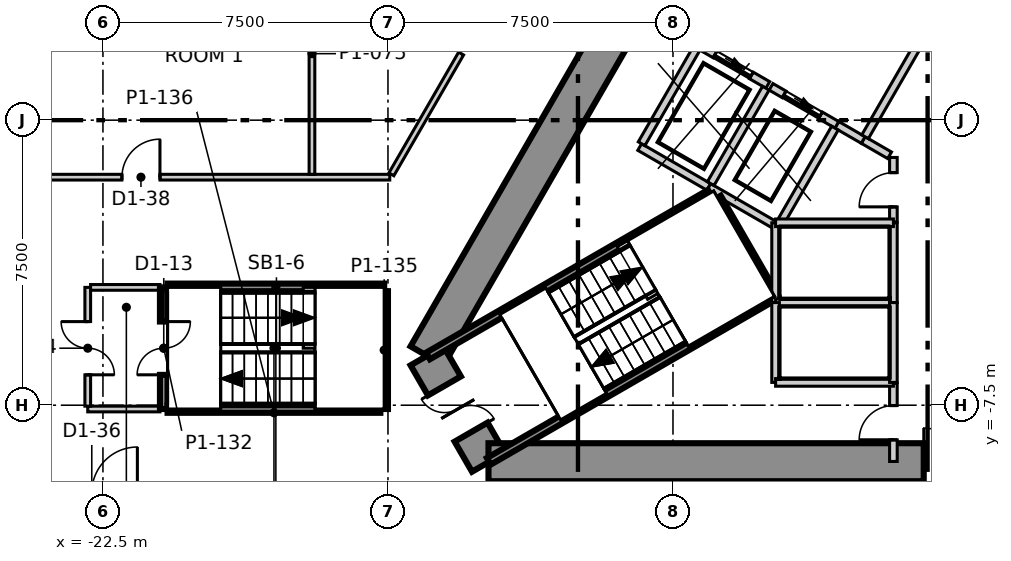
"""IFC4 building model, lengths in metres.
Left out: names, types, materials, properties, quantities, classifications, styles, units other than length and angle.
Written with IfcOpenShell. Run it as: python <this file> out.ifc"""

import sys

from ifc_helpers import new_model, si_unit, direction, frame, frame_2d, origin, place, context, subcontext, project, spatial, polyline, rectangle, outline, extrude, element, fill, save


model = new_model("IFC4")
c1 = context("Model", 3, precision=1e-05, world=origin(), true_north=direction((0.0, 1.0)))
c2 = subcontext(c1, "Body", "Model", "MODEL_VIEW")
j1 = project(units=[si_unit("LENGTHUNIT", "METRE"), si_unit("PLANEANGLEUNIT", "RADIAN")], contexts=[c1])
p1 = place(None, origin())
s1 = spatial("IfcSite", under=j1, at=p1, CompositionType="ELEMENT")
p2 = place(p1, origin())
s2 = spatial("IfcBuilding", under=s1, at=p2, CompositionType="ELEMENT")
p3 = place(p2, frame((0.0, 0.0, -5.5)))
s3 = spatial("IfcBuildingStorey", under=s2, at=p3, CompositionType="ELEMENT", Elevation=-5.5)
p4 = place(p3, frame((-3.507, 38.325, -0.4), z_axis=(0.0, 0.0, 1.0), x_axis=(-0.500003790369, -0.866023215403, 0.0)))
e1 = element("IfcWall", 1, at=p4, inside=s3, PredefinedType="SOLIDWALL", context=c2, shape_type="SweptSolid", body=[
    extrude(rectangle(XDim=62.874, YDim=0.6, at=frame_2d((31.437, 0.0))), origin(), (0.0, 0.0, 1.0), 5.5),
])
p5 = place(p3, frame((-1.617, 15.2, -0.4), z_axis=(0.0, 0.0, 1.0), x_axis=(-0.499992141631, -0.866029940768, 0.0)))
e2 = element("IfcWall", 2, at=p5, inside=s3, PredefinedType="SHEAR", context=c2, shape_type="SweptSolid", body=[
    extrude(outline(polyline([(-0.289, -0.499), (1.656, -0.499), (3.601, -0.499), (5.547, -0.499), (7.492, -0.499), (9.437, -0.5), (11.382, -0.5), (13.328, -0.5), (15.273, -0.5), (17.218, -0.5), (19.163, -0.5), (21.109, -0.5), (23.054, -0.5), (24.999, -0.5), (24.422, 0.5), (22.566, 0.5), (20.709, 0.5), (18.853, 0.5), (16.997, 0.5), (15.14, 0.5), (13.284, 0.5), (11.427, 0.5), (9.571, 0.5), (7.715, 0.5), (5.858, 0.5), (4.002, 0.5), (2.146, 0.5), (0.289, 0.5), (-0.289, -0.499)])), origin(), (0.0, 0.0, 1.0), 5.5),
])
p6 = place(p5, frame((11.805, 0.0, 0.4)))
e3 = element("IfcOpeningElement", 3, at=p6, cuts=e2, PredefinedType="OPENING", context=c2, shape_type="SweptSolid", body=[
    extrude(rectangle(XDim=1.1, YDim=2.1, at=frame_2d((0.55, 1.05))), frame((0.0, 0.51, 0.0), z_axis=(0.0, -1.0, 0.0), x_axis=(1.0, 0.0, 0.0)), (0.0, 0.0, 1.0), 1.02),
])
p7 = place(p3, frame((-13.972, -6.2, -0.4), z_axis=(0.0, 0.0, 1.0), x_axis=(0.500077567175, -0.865980615723, 0.0)))
e4 = element("IfcWall", 4, at=p7, inside=s3, PredefinedType="SHEAR", context=c2, shape_type="SweptSolid", body=[
    extrude(outline(polyline([(-0.289, -0.5), (1.616, -0.5), (3.522, -0.5), (2.944, 0.499), (1.617, 0.5), (0.289, 0.5), (-0.289, -0.5)])), origin(), (0.0, 0.0, 1.0), 5.5),
])
p8 = place(p7, frame((0.917, 0.0, 0.4)))
e5 = element("IfcOpeningElement", 5, at=p8, cuts=e4, PredefinedType="OPENING", context=c2, shape_type="SweptSolid", body=[
    extrude(rectangle(XDim=1.4, YDim=2.1, at=frame_2d((0.7, 1.05))), frame((0.0, 0.51, 0.0), z_axis=(0.0, -1.0, 0.0), x_axis=(1.0, 0.0, 0.0)), (0.0, 0.0, 1.0), 1.02),
])
p9 = place(p3, frame((-12.355, -9.0, -0.4), z_axis=(0.0, 0.0, 1.0), x_axis=(1.0, 0.0, 0.0)))
e6 = element("IfcWall", 6, at=p9, inside=s3, PredefinedType="SHEAR", context=c2, shape_type="SweptSolid", body=[
    extrude(outline(polyline([(-0.289, -0.5), (1.656, -0.5), (3.601, -0.5), (5.547, -0.5), (7.492, -0.5), (9.437, -0.5), (11.382, -0.5), (13.328, -0.5), (15.273, -0.5), (17.218, -0.5), (19.163, -0.5), (21.109, -0.5), (23.054, -0.5), (24.999, -0.5), (24.422, 0.5), (22.566, 0.5), (20.709, 0.5), (18.853, 0.5), (16.996, 0.5), (15.14, 0.5), (13.283, 0.5), (11.427, 0.5), (9.57, 0.5), (7.714, 0.5), (5.857, 0.5), (4.001, 0.5), (2.145, 0.5), (0.288, 0.5), (-0.289, -0.5)])), origin(), (0.0, 0.0, 1.0), 5.5),
])
p10 = place(p9, frame((11.455, 0.0, 0.4)))
e7 = element("IfcOpeningElement", 7, at=p10, cuts=e6, PredefinedType="OPENING", context=c2, shape_type="SweptSolid", body=[
    extrude(rectangle(XDim=1.8, YDim=2.1, at=frame_2d((0.9, 1.05))), frame((0.0, 0.51, 0.0), z_axis=(0.0, -1.0, 0.0), x_axis=(1.0, 0.0, 0.0)), (0.0, 0.0, 1.0), 1.02),
])
p11 = place(p3, frame((-22.9, -7.6, 0.0), z_axis=(0.0, 0.0, 1.0), x_axis=(1.0, 0.0, 0.0)))
e8 = element("IfcWall", 8, at=p11, inside=s3, PredefinedType="PARTITIONING", context=c2, shape_type="SweptSolid", body=[
    extrude(rectangle(XDim=1.9, YDim=0.15, at=frame_2d((0.95, 0.0))), origin(), (0.0, 0.0, 1.0), 5.1),
])
p12 = place(p3, frame((-22.9, -7.525, 0.0), z_axis=(0.0, 0.0, 1.0), x_axis=(0.0, 1.0, 0.0)))
e9 = element("IfcWall", 9, at=p12, inside=s3, PredefinedType="PARTITIONING", context=c2, shape_type="SweptSolid", body=[
    extrude(rectangle(XDim=3.125, YDim=0.15, at=frame_2d((1.562, 0.0))), origin(), (0.0, 0.0, 1.0), 5.1),
])
p13 = place(p12, frame((0.825, 0.0, 0.0)))
e10 = element("IfcOpeningElement", 10, at=p13, cuts=e9, PredefinedType="OPENING", context=c2, shape_type="SweptSolid", body=[
    extrude(rectangle(XDim=1.4, YDim=2.1, at=frame_2d((0.7, 1.05))), frame((0.0, 0.085, 0.0), z_axis=(0.0, -1.0, 0.0), x_axis=(1.0, 0.0, 0.0)), (0.0, 0.0, 1.0), 0.17),
])
p14 = place(p3, frame((-22.825, -4.4, 0.0), z_axis=(0.0, 0.0, 1.0), x_axis=(1.0, 0.0, 0.0)))
e11 = element("IfcWall", 11, at=p14, inside=s3, PredefinedType="PARTITIONING", context=c2, shape_type="SweptSolid", body=[
    extrude(rectangle(XDim=1.825, YDim=0.15, at=frame_2d((0.913, 0.0))), origin(), (0.0, 0.0, 1.0), 5.1),
])
p15 = place(p3, frame((-26.0, -1.5, 0.0), z_axis=(0.0, 0.0, 1.0), x_axis=(1.0, 0.0, 0.0)))
e12 = element("IfcWall", 12, at=p15, inside=s3, PredefinedType="PARTITIONING", context=c2, shape_type="SweptSolid", body=[
    extrude(rectangle(XDim=11.047, YDim=0.15, at=frame_2d((5.523, 0.0))), origin(), (0.0, 0.0, 1.0), 4.5),
])
p16 = place(p15, frame((4.0, 0.0, 0.0)))
e13 = element("IfcOpeningElement", 13, at=p16, cuts=e12, PredefinedType="OPENING", context=c2, shape_type="SweptSolid", body=[
    extrude(rectangle(XDim=1.0, YDim=2.1, at=frame_2d((0.5, 1.05))), frame((0.0, 0.085, 0.0), z_axis=(0.0, -1.0, 0.0), x_axis=(1.0, 0.0, 0.0)), (0.0, 0.0, 1.0), 0.17),
])
p17 = place(p3, frame((-14.91, -1.425, 0.0), z_axis=(0.0, 0.0, 1.0), x_axis=(0.500031511731, 0.866007209713, 0.0)))
e14 = element("IfcWall", 14, at=p17, inside=s3, PredefinedType="PARTITIONING", context=c2, shape_type="SweptSolid", body=[
    extrude(rectangle(XDim=3.67, YDim=0.15, at=frame_2d((1.835, 0.0))), origin(), (0.0, 0.0, 1.0), 5.1),
])
p18 = place(p3, frame((-17.0, -1.425, 0.0), z_axis=(0.0, 0.0, 1.0), x_axis=(0.0, 1.0, 0.0)))
e15 = element("IfcWall", 15, at=p18, inside=s3, PredefinedType="PARTITIONING", context=c2, shape_type="SweptSolid", body=[
    extrude(rectangle(XDim=6.35, YDim=0.15, at=frame_2d((3.175, 0.0))), origin(), (0.0, 0.0, 1.0), 5.1),
])
p19 = place(p3, frame((-8.376, -0.707, 0.0), z_axis=(0.0, 0.0, 1.0), x_axis=(0.866067520717, -0.499927044236, 0.0)))
e16 = element("IfcWall", 16, at=p19, inside=s3, PredefinedType="SOLIDWALL", context=c2, shape_type="SweptSolid", body=[
    extrude(rectangle(XDim=2.1, YDim=0.2, at=frame_2d((1.05, 0.0))), origin(), (0.0, 0.0, 1.0), 5.1),
])
p20 = place(p3, frame((-8.326, -0.62, 0.0), z_axis=(0.0, 0.0, 1.0), x_axis=(0.500023687443, 0.866011727401, 0.0)))
e17 = element("IfcWall", 17, at=p20, inside=s3, PredefinedType="SOLIDWALL", context=c2, shape_type="SweptSolid", body=[
    extrude(rectangle(XDim=2.9, YDim=0.2, at=frame_2d((1.45, 0.0))), origin(), (0.0, 0.0, 1.0), 5.1),
])
p21 = place(p3, frame((-1.7, -8.98, 0.0), z_axis=(0.0, 0.0, 1.0), x_axis=(0.0, 1.0, 0.0)))
e18 = element("IfcWall", 18, at=p21, inside=s3, PredefinedType="SOLIDWALL", context=c2, shape_type="SweptSolid", body=[
    extrude(rectangle(XDim=2.062, YDim=0.2, at=frame_2d((1.031, 0.0))), origin(), (0.0, 0.0, 1.0), 5.1),
])
p22 = place(p21, frame((0.57, 0.0, 0.0)))
e19 = element("IfcOpeningElement", 19, at=p22, cuts=e18, PredefinedType="OPENING", context=c2, shape_type="SweptSolid", body=[
    extrude(rectangle(XDim=0.9, YDim=2.1, at=frame_2d((0.45, 1.05))), frame((0.0, 0.11, 0.0), z_axis=(0.0, -1.0, 0.0), x_axis=(1.0, 0.0, 0.0)), (0.0, 0.0, 1.0), 0.22),
])
p23 = place(p3, frame((-1.7, -2.682, 0.0), z_axis=(0.0, 0.0, 1.0), x_axis=(0.0, 1.0, 0.0)))
e20 = element("IfcWall", 20, at=p23, inside=s3, PredefinedType="SOLIDWALL", context=c2, shape_type="SweptSolid", body=[
    extrude(rectangle(XDim=1.701, YDim=0.2, at=frame_2d((0.851, 0.0))), origin(), (0.0, 0.0, 1.0), 5.1),
])
p24 = place(p23, frame((0.401, 0.0, 0.0)))
e21 = element("IfcOpeningElement", 21, at=p24, cuts=e20, PredefinedType="OPENING", context=c2, shape_type="SweptSolid", body=[
    extrude(rectangle(XDim=0.9, YDim=2.1, at=frame_2d((0.45, 1.05))), frame((0.0, 0.11, 0.0), z_axis=(0.0, -1.0, 0.0), x_axis=(1.0, 0.0, 0.0)), (0.0, 0.0, 1.0), 0.22),
])
p25 = place(p3, frame((-2.495, -0.522, 0.0), z_axis=(0.0, 0.0, 1.0), x_axis=(0.86559276406, -0.500748606395, 0.0)))
e22 = element("IfcWall", 22, at=p25, inside=s3, PredefinedType="SOLIDWALL", context=c2, shape_type="SweptSolid", body=[
    extrude(rectangle(XDim=0.803, YDim=0.2, at=frame_2d((0.401, 0.0))), origin(), (0.0, 0.0, 1.0), 5.1),
])
p26 = place(p3, frame((-8.627, 3.018, 0.0), z_axis=(0.0, 0.0, 1.0), x_axis=(0.866039775641, -0.499975106388, 0.0)))
e23 = element("IfcWall", 23, at=p26, inside=s3, PredefinedType="SOLIDWALL", context=c2, shape_type="SweptSolid", body=[
    extrude(rectangle(XDim=4.182, YDim=0.2, at=frame_2d((2.091, 0.0))), origin(), (0.0, 0.0, 1.0), 5.1),
])
p27 = place(p26, frame((2.58, 0.0, 0.0)))
e24 = element("IfcOpeningElement", 24, at=p27, cuts=e23, PredefinedType="OPENING", context=c2, shape_type="SweptSolid", body=[
    extrude(rectangle(XDim=1.1, YDim=2.1, at=frame_2d((0.55, 1.05))), frame((0.0, 0.11, 0.0), z_axis=(0.0, -1.0, 0.0), x_axis=(1.0, 0.0, 0.0)), (0.0, 0.0, 1.0), 0.22),
])
p28 = place(p3, frame((-3.19, -0.121, 0.0), z_axis=(0.0, 0.0, 1.0), x_axis=(0.866175452185, -0.499740018442, 0.0)))
e25 = element("IfcWall", 25, at=p28, inside=s3, PredefinedType="SOLIDWALL", context=c2, shape_type="SweptSolid", body=[
    extrude(rectangle(XDim=0.802, YDim=0.2, at=frame_2d((0.401, 0.0))), origin(), (0.0, 0.0, 1.0), 5.1),
])
p29 = place(p3, frame((-2.445, -0.436, 0.0), z_axis=(0.0, 0.0, 1.0), x_axis=(0.499929347863, 0.866066190972, 0.0)))
e26 = element("IfcWall", 26, at=p29, inside=s3, PredefinedType="SOLIDWALL", context=c2, shape_type="SweptSolid", body=[
    extrude(rectangle(XDim=3.201, YDim=0.2, at=frame_2d((1.6, 0.0))), origin(), (0.0, 0.0, 1.0), 5.1),
])
p30 = place(p3, frame((-6.557, -1.757, 0.0), z_axis=(0.0, 0.0, 1.0), x_axis=(0.866019539041, -0.500010157896, 0.0)))
e27 = element("IfcWall", 27, at=p30, inside=s3, PredefinedType="SOLIDWALL", context=c2, shape_type="SweptSolid", body=[
    extrude(rectangle(XDim=2.008, YDim=0.2, at=frame_2d((1.004, 0.0))), origin(), (0.0, 0.0, 1.0), 5.1),
])
p31 = place(p3, frame((-6.507, -1.67, 0.0), z_axis=(0.0, 0.0, 1.0), x_axis=(0.50012328804, 0.865954211699, 0.0)))
e28 = element("IfcWall", 28, at=p31, inside=s3, PredefinedType="SOLIDWALL", context=c2, shape_type="SweptSolid", body=[
    extrude(rectangle(XDim=2.9, YDim=0.2, at=frame_2d((1.45, 0.0))), origin(), (0.0, 0.0, 1.0), 5.1),
])
p32 = place(p3, frame((-4.92, 0.878, 0.0), z_axis=(0.0, 0.0, 1.0), x_axis=(0.866010750942, -0.50002537861, 0.0)))
e29 = element("IfcWall", 29, at=p32, inside=s3, PredefinedType="SOLIDWALL", context=c2, shape_type="SweptSolid", body=[
    extrude(rectangle(XDim=2.0, YDim=0.2, at=frame_2d((1.0, 0.0))), origin(), (0.0, 0.0, 1.0), 5.1),
])
p33 = place(p32, frame((0.4, 0.0, 0.0)))
e30 = element("IfcOpeningElement", 30, at=p33, cuts=e29, PredefinedType="OPENING", context=c2, shape_type="SweptSolid", body=[
    extrude(rectangle(XDim=1.1, YDim=2.1, at=frame_2d((0.55, 1.05))), frame((0.0, 0.11, 0.0), z_axis=(0.0, -1.0, 0.0), x_axis=(1.0, 0.0, 0.0)), (0.0, 0.0, 1.0), 0.22),
])
p34 = place(p3, frame((-4.666, -2.682, 0.0), z_axis=(0.0, 0.0, 1.0), x_axis=(0.500065346707, 0.865987672558, 0.0)))
e31 = element("IfcWall", 31, at=p34, inside=s3, PredefinedType="SOLIDWALL", context=c2, shape_type="SweptSolid", body=[
    extrude(rectangle(XDim=2.855, YDim=0.2, at=frame_2d((1.428, 0.0))), origin(), (0.0, 0.0, 1.0), 5.1),
])
p35 = place(p3, frame((-13.946, -6.204, 0.0), z_axis=(0.0, 0.0, 1.0), x_axis=(0.866036527536, 0.499980732602, 0.0)))
e32 = element("IfcWall", 32, at=p35, inside=s3, PredefinedType="SOLIDWALL", context=c2, shape_type="SweptSolid", body=[
    extrude(rectangle(XDim=8.564, YDim=0.2, at=frame_2d((4.282, 0.0))), origin(), (0.0, 0.0, 1.0), 5.1),
])
p36 = place(p3, frame((-6.329, -2.038, 0.0), z_axis=(0.0, 0.0, 1.0), x_axis=(0.50002537861, -0.866010750942, 0.0)))
e33 = element("IfcWall", 33, at=p36, inside=s3, PredefinedType="SOLIDWALL", context=c2, shape_type="SweptSolid", body=[
    extrude(rectangle(XDim=3.0, YDim=0.2, at=frame_2d((1.5, 0.0))), origin(), (0.0, 0.0, 1.0), 5.1),
])
p37 = place(p3, frame((-12.346, -8.976, 0.0), z_axis=(0.0, 0.0, 1.0), x_axis=(0.866006929508, 0.50003199702, 0.0)))
e34 = element("IfcWall", 34, at=p37, inside=s3, PredefinedType="SOLIDWALL", context=c2, shape_type="SweptSolid", body=[
    extrude(rectangle(XDim=8.58, YDim=0.2, at=frame_2d((4.29, 0.0))), origin(), (0.0, 0.0, 1.0), 5.1),
])
p38 = place(p3, frame((-20.9, -7.6, 0.0), z_axis=(0.0, 0.0, 1.0), x_axis=(0.0, 1.0, 0.0)))
e35 = element("IfcWall", 35, at=p38, inside=s3, PredefinedType="SOLIDWALL", context=c2, shape_type="SweptSolid", body=[
    extrude(rectangle(XDim=3.2, YDim=0.2, at=frame_2d((1.6, 0.0))), origin(), (0.0, 0.0, 1.0), 5.1),
])
p39 = place(p38, frame((0.9, 0.0, 0.0)))
e36 = element("IfcOpeningElement", 36, at=p39, cuts=e35, PredefinedType="OPENING", context=c2, shape_type="SweptSolid", body=[
    extrude(rectangle(XDim=1.4, YDim=2.1, at=frame_2d((0.7, 1.05))), frame((0.0, 0.11, 0.0), z_axis=(0.0, -1.0, 0.0), x_axis=(1.0, 0.0, 0.0)), (0.0, 0.0, 1.0), 0.22),
])
p40 = place(p3, frame((-20.8, -4.4, 0.0), z_axis=(0.0, 0.0, 1.0), x_axis=(1.0, 0.0, 0.0)))
e37 = element("IfcWall", 37, at=p40, inside=s3, PredefinedType="SOLIDWALL", context=c2, shape_type="SweptSolid", body=[
    extrude(rectangle(XDim=5.7, YDim=0.2, at=frame_2d((2.85, 0.0))), origin(), (0.0, 0.0, 1.0), 5.1),
])
p41 = place(p3, frame((-15.1, -7.6, 0.0), z_axis=(0.0, 0.0, 1.0), x_axis=(0.0, 1.0, 0.0)))
e38 = element("IfcWall", 38, at=p41, inside=s3, PredefinedType="SOLIDWALL", context=c2, shape_type="SweptSolid", body=[
    extrude(rectangle(XDim=3.1, YDim=0.2, at=frame_2d((1.55, 0.0))), origin(), (0.0, 0.0, 1.0), 5.1),
])
p42 = place(p3, frame((-20.8, -7.6, 0.0), z_axis=(0.0, 0.0, 1.0), x_axis=(1.0, 0.0, 0.0)))
e39 = element("IfcWall", 39, at=p42, inside=s3, PredefinedType="SOLIDWALL", context=c2, shape_type="SweptSolid", body=[
    extrude(rectangle(XDim=5.6, YDim=0.2, at=frame_2d((2.8, 0.0))), origin(), (0.0, 0.0, 1.0), 5.1),
])
p43 = place(p3, frame((-4.8, -2.7, 3.9), z_axis=(0.0, 0.0, 1.0), x_axis=(0.0, -1.0, 0.0)))
e40 = element("IfcWall", 40, at=p43, inside=s3, PredefinedType="SOLIDWALL", context=c2, shape_type="SweptSolid", body=[
    extrude(outline(polyline([(0.1, 0.1), (2.0, 0.1), (2.2, -0.1), (1.05, -0.1), (-0.1, -0.1), (0.1, 0.1)])), origin(), (0.0, 0.0, 1.0), 1.2),
])
p44 = place(p3, frame((-4.8, -4.8, 3.9), z_axis=(0.0, 0.0, 1.0), x_axis=(1.0, 0.0, 0.0)))
e41 = element("IfcWall", 41, at=p44, inside=s3, PredefinedType="SOLIDWALL", context=c2, shape_type="SweptSolid", body=[
    extrude(outline(polyline([(3.0, 0.1), (3.2, -0.1), (1.55, -0.1), (-0.099, -0.1), (0.1, 0.1), (0.1, 0.1), (0.1, 0.1), (0.1, 0.1), (0.1, 0.1), (0.1, 0.1), (0.1, 0.1), (0.1, 0.1), (0.1, 0.1), (1.55, 0.1), (3.0, 0.1)])), origin(), (0.0, 0.0, 1.0), 1.2),
])
p45 = place(p3, frame((-1.7, -4.8, 3.9), z_axis=(0.0, 0.0, 1.0), x_axis=(0.0, 1.0, 0.0)))
e42 = element("IfcWall", 42, at=p45, inside=s3, PredefinedType="SOLIDWALL", context=c2, shape_type="SweptSolid", body=[
    extrude(outline(polyline([(2.0, 0.1), (2.2, -0.1), (1.05, -0.1), (-0.099, -0.1), (0.1, 0.1), (0.1, 0.1), (0.1, 0.1), (0.1, 0.1), (0.1, 0.1), (0.1, 0.1), (0.1, 0.1), (0.1, 0.1), (0.1, 0.1), (2.0, 0.1)])), origin(), (0.0, 0.0, 1.0), 1.2),
])
p46 = place(p3, frame((-1.7, -2.7, 3.9), z_axis=(0.0, 0.0, 1.0), x_axis=(-1.0, 0.0, 0.0)))
e43 = element("IfcWall", 43, at=p46, inside=s3, PredefinedType="SOLIDWALL", context=c2, shape_type="SweptSolid", body=[
    extrude(outline(polyline([(3.0, 0.1), (3.0, 0.1), (3.0, 0.1), (3.0, 0.1), (3.0, 0.1), (3.0, 0.1), (3.0, 0.1), (3.0, 0.1), (3.0, 0.1), (3.199, -0.1), (1.55, -0.1), (-0.099, -0.1), (0.1, 0.1), (0.1, 0.1), (0.1, 0.1), (0.1, 0.1), (0.1, 0.1), (0.1, 0.1), (0.1, 0.1), (0.1, 0.1), (0.101, 0.1), (1.551, 0.1), (3.0, 0.1)])), origin(), (0.0, 0.0, 1.0), 1.2),
])
p47 = place(p3, frame((-4.8, -4.8, 3.9), z_axis=(0.0, 0.0, 1.0), x_axis=(0.0, -1.0, 0.0)))
e44 = element("IfcWall", 44, at=p47, inside=s3, PredefinedType="SOLIDWALL", context=c2, shape_type="SweptSolid", body=[
    extrude(outline(polyline([(2.0, 0.1), (2.2, -0.1), (1.15, -0.1), (0.1, -0.1), (0.1, 0.1), (2.0, 0.1)])), origin(), (0.0, 0.0, 1.0), 1.2),
])
p48 = place(p3, frame((-4.8, -6.9, 3.9), z_axis=(0.0, 0.0, 1.0), x_axis=(1.0, 0.0, 0.0)))
e45 = element("IfcWall", 45, at=p48, inside=s3, PredefinedType="SOLIDWALL", context=c2, shape_type="SweptSolid", body=[
    extrude(outline(polyline([(3.0, 0.1), (3.2, -0.1), (1.55, -0.1), (-0.099, -0.1), (0.1, 0.1), (0.1, 0.1), (0.1, 0.1), (0.1, 0.1), (0.1, 0.1), (0.1, 0.1), (0.1, 0.1), (0.1, 0.1), (0.1, 0.1), (1.55, 0.1), (3.0, 0.1)])), origin(), (0.0, 0.0, 1.0), 1.2),
])
p49 = place(p3, frame((-1.7, -6.9, 3.9), z_axis=(0.0, 0.0, 1.0), x_axis=(0.0, 1.0, 0.0)))
e46 = element("IfcWall", 46, at=p49, inside=s3, PredefinedType="SOLIDWALL", context=c2, shape_type="SweptSolid", body=[
    extrude(outline(polyline([(2.0, 0.1), (2.0, -0.1), (0.95, -0.1), (-0.099, -0.1), (0.1, 0.1), (0.1, 0.1), (0.1, 0.1), (0.1, 0.1), (0.1, 0.1), (0.1, 0.1), (0.1, 0.1), (0.1, 0.1), (0.1, 0.1), (2.0, 0.1)])), origin(), (0.0, 0.0, 1.0), 1.2),
])
p50 = place(p33, origin())
e47 = element("IfcDoor", 47, at=p50, inside=s3, OperationType="SLIDING_TO_LEFT", PredefinedType="DOOR", context=c2, shape_type="SweptSolid", body=[
    extrude(rectangle(XDim=1.1, YDim=2.1, at=frame_2d((0.55, 1.05))), frame((0.0, 0.025, 0.0), z_axis=(0.0, -1.0, 0.0), x_axis=(1.0, 0.0, 0.0)), (0.0, 0.0, 1.0), 0.05),
])
fill(e30, e47)
p51 = place(p27, origin())
e48 = element("IfcDoor", 48, at=p51, inside=s3, OperationType="SLIDING_TO_LEFT", PredefinedType="DOOR", context=c2, shape_type="SweptSolid", body=[
    extrude(rectangle(XDim=1.1, YDim=2.1, at=frame_2d((0.55, 1.05))), frame((0.0, 0.025, 0.0), z_axis=(0.0, -1.0, 0.0), x_axis=(1.0, 0.0, 0.0)), (0.0, 0.0, 1.0), 0.05),
])
fill(e24, e48)
p52 = place(p39, origin())
e49 = element("IfcDoor", 49, at=p52, inside=s3, OperationType="DOUBLE_DOOR_SINGLE_SWING", PredefinedType="DOOR", context=c2, shape_type="SweptSolid", body=[
    extrude(rectangle(XDim=1.4, YDim=2.1, at=frame_2d((0.7, 1.05))), frame((0.0, 0.025, 0.0), z_axis=(0.0, -1.0, 0.0), x_axis=(1.0, 0.0, 0.0)), (0.0, 0.0, 1.0), 0.05),
])
fill(e36, e49)
p53 = place(p13, origin())
e50 = element("IfcDoor", 50, at=p53, inside=s3, OperationType="DOUBLE_DOOR_SINGLE_SWING", PredefinedType="DOOR", context=c2, shape_type="SweptSolid", body=[
    extrude(rectangle(XDim=1.4, YDim=2.1, at=frame_2d((0.7, 1.05))), frame((0.0, 0.025, 0.0), z_axis=(0.0, -1.0, 0.0), x_axis=(1.0, 0.0, 0.0)), (0.0, 0.0, 1.0), 0.05),
])
fill(e10, e50)
p54 = place(p16, origin())
e51 = element("IfcDoor", 51, at=p54, inside=s3, OperationType="SINGLE_SWING_LEFT", PredefinedType="DOOR", context=c2, shape_type="SweptSolid", body=[
    extrude(rectangle(XDim=1.0, YDim=2.1, at=frame_2d((0.5, 1.05))), frame((0.0, 0.025, 0.0), z_axis=(0.0, -1.0, 0.0), x_axis=(1.0, 0.0, 0.0)), (0.0, 0.0, 1.0), 0.05),
])
fill(e13, e51)
p55 = place(p10, origin())
e52 = element("IfcDoor", 52, at=p55, inside=s3, OperationType="DOUBLE_DOOR_SINGLE_SWING", PredefinedType="DOOR", context=c2, shape_type="SweptSolid", body=[
    extrude(rectangle(XDim=1.8, YDim=2.1, at=frame_2d((0.9, 1.05))), frame((0.0, 0.025, 0.0), z_axis=(0.0, -1.0, 0.0), x_axis=(1.0, 0.0, 0.0)), (0.0, 0.0, 1.0), 0.05),
])
fill(e7, e52)
p56 = place(p8, origin())
e53 = element("IfcDoor", 53, at=p56, inside=s3, OperationType="DOUBLE_DOOR_SINGLE_SWING", PredefinedType="DOOR", context=c2, shape_type="SweptSolid", body=[
    extrude(rectangle(XDim=1.4, YDim=2.1, at=frame_2d((0.7, 1.05))), frame((0.0, 0.025, 0.0), z_axis=(0.0, -1.0, 0.0), x_axis=(1.0, 0.0, 0.0)), (0.0, 0.0, 1.0), 0.05),
])
fill(e5, e53)
p57 = place(p22, origin())
e54 = element("IfcDoor", 54, at=p57, inside=s3, OperationType="SINGLE_SWING_RIGHT", PredefinedType="DOOR", context=c2, shape_type="SweptSolid", body=[
    extrude(rectangle(XDim=0.9, YDim=2.1, at=frame_2d((0.45, 1.05))), frame((0.0, 0.025, 0.0), z_axis=(0.0, -1.0, 0.0), x_axis=(1.0, 0.0, 0.0)), (0.0, 0.0, 1.0), 0.05),
])
fill(e19, e54)
p58 = place(p24, origin())
e55 = element("IfcDoor", 55, at=p58, inside=s3, OperationType="SINGLE_SWING_RIGHT", PredefinedType="DOOR", context=c2, shape_type="SweptSolid", body=[
    extrude(rectangle(XDim=0.9, YDim=2.1, at=frame_2d((0.45, 1.05))), frame((0.0, 0.025, 0.0), z_axis=(0.0, -1.0, 0.0), x_axis=(1.0, 0.0, 0.0)), (0.0, 0.0, 1.0), 0.05),
])
fill(e21, e55)
save(model, sys.argv[1])
